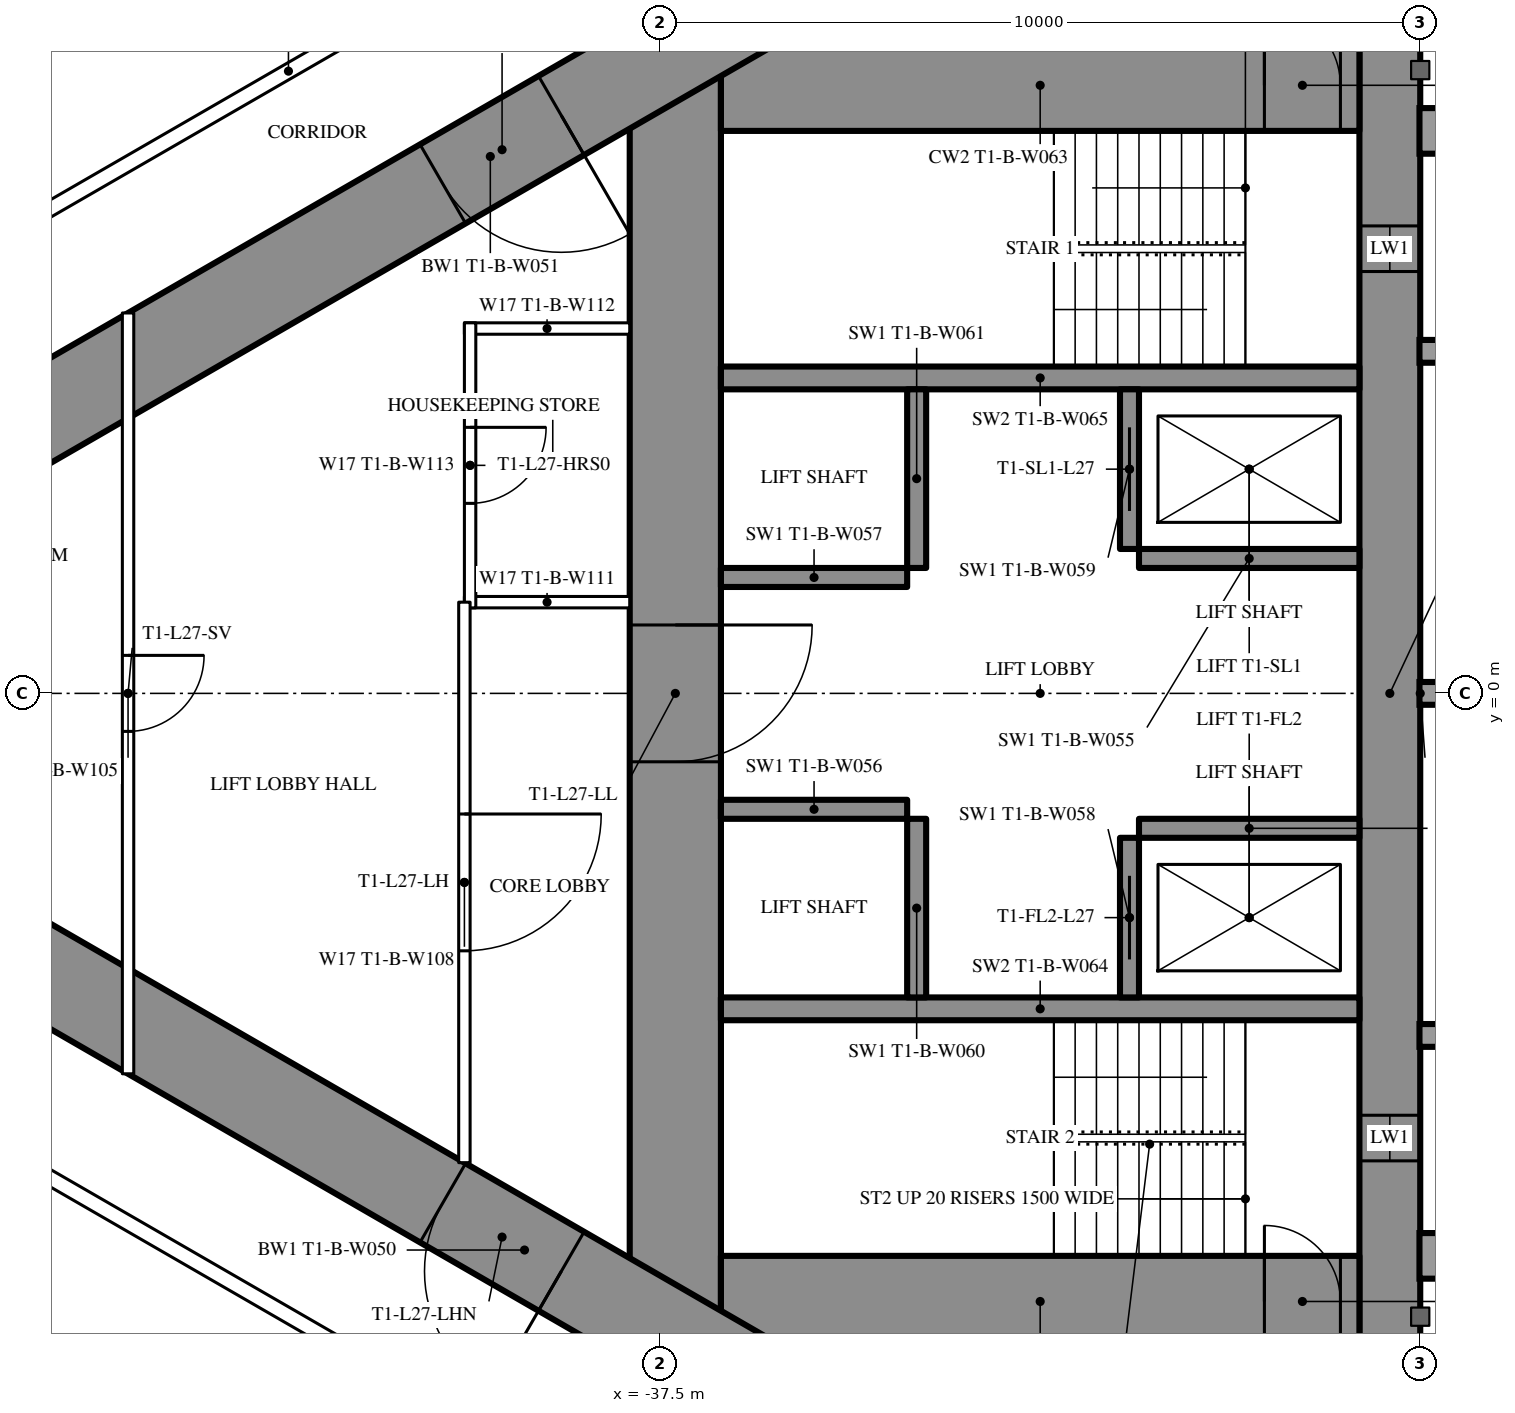
"""IFC4 building model, lengths in metres.
Left out: names, types, materials, properties, quantities, classifications, styles, units other than length and angle.
Written with IfcOpenShell. Run it as: python <this file> out.ifc"""

import sys

from ifc_helpers import new_model, si_unit, direction, frame, frame_2d, origin, place, context, subcontext, project, spatial, rectangle, extrude, element, fill, save


model = new_model("IFC4")
c1 = context("Model", 3, precision=1e-05, world=origin(), true_north=direction((0.0, 1.0)))
c2 = subcontext(c1, "Body", "Model", "MODEL_VIEW")
j1 = project(units=[si_unit("LENGTHUNIT", "METRE"), si_unit("PLANEANGLEUNIT", "RADIAN")], contexts=[c1])
p1 = place(None, origin())
s1 = spatial("IfcSite", under=j1, at=p1, CompositionType="ELEMENT")
p2 = place(p1, origin())
s2 = spatial("IfcBuilding", under=s1, at=p2, CompositionType="ELEMENT")
p3 = place(p2, frame((0.0, 0.0, 104.6)))
s3 = spatial("IfcBuildingStorey", under=s2, at=p3, CompositionType="ELEMENT", Elevation=104.6)
p4 = place(p3, frame((-27.9, 8.6, 0.0), z_axis=(0.0, 0.0, 1.0), x_axis=(0.0, -1.0, 0.0)))
e1 = element("IfcWall", 1, at=p4, inside=s3, PredefinedType="SHEAR", context=c2, shape_type="SweptSolid", body=[
    extrude(rectangle(XDim=17.2, YDim=0.8, at=frame_2d((8.6, 0.0))), origin(), (0.0, 0.0, 1.0), 3.5),
])
p5 = place(p4, frame((2.45, 0.0, 0.6)))
e2 = element("IfcOpeningElement", 2, at=p5, cuts=e1, PredefinedType="OPENING", context=c2, shape_type="SweptSolid", body=[
    extrude(rectangle(XDim=0.6, YDim=2.1, at=frame_2d((0.3, 1.05))), frame((0.0, 0.41, 0.0), z_axis=(0.0, -1.0, 0.0), x_axis=(1.0, 0.0, 0.0)), (0.0, 0.0, 1.0), 0.82),
])
p6 = place(p4, frame((14.15, 0.0, 0.6)))
e3 = element("IfcOpeningElement", 3, at=p6, cuts=e1, PredefinedType="OPENING", context=c2, shape_type="SweptSolid", body=[
    extrude(rectangle(XDim=0.6, YDim=2.1, at=frame_2d((0.3, 1.05))), frame((0.0, 0.41, 0.0), z_axis=(0.0, -1.0, 0.0), x_axis=(1.0, 0.0, 0.0)), (0.0, 0.0, 1.0), 0.82),
])
p7 = place(p3, frame((-37.3, 8.6, 0.0), z_axis=(0.0, 0.0, 1.0), x_axis=(0.0, -1.0, 0.0)))
e4 = element("IfcWall", 4, at=p7, inside=s3, PredefinedType="SHEAR", context=c2, shape_type="SweptSolid", body=[
    extrude(rectangle(XDim=17.2, YDim=1.2, at=frame_2d((8.6, 0.0))), origin(), (0.0, 0.0, 1.0), 3.5),
])
p8 = place(p7, frame((7.7, 0.0, 0.0)))
e5 = element("IfcOpeningElement", 5, at=p8, cuts=e4, PredefinedType="OPENING", context=c2, shape_type="SweptSolid", body=[
    extrude(rectangle(XDim=1.8, YDim=2.2, at=frame_2d((0.9, 1.1))), frame((0.0, 0.61, 0.0), z_axis=(0.0, -1.0, 0.0), x_axis=(1.0, 0.0, 0.0)), (0.0, 0.0, 1.0), 1.22),
])
p9 = place(p3, frame((-28.3, 8.0, 0.0), z_axis=(0.0, 0.0, 1.0), x_axis=(-1.0, 0.0, 0.0)))
e6 = element("IfcWall", 6, at=p9, inside=s3, PredefinedType="SHEAR", context=c2, shape_type="SweptSolid", body=[
    extrude(rectangle(XDim=8.4, YDim=1.2, at=frame_2d((4.2, 0.0))), origin(), (0.0, 0.0, 1.0), 3.5),
])
p10 = place(p9, frame((0.25, 0.0, 0.0)))
e7 = element("IfcOpeningElement", 7, at=p10, cuts=e6, PredefinedType="OPENING", context=c2, shape_type="SweptSolid", body=[
    extrude(rectangle(XDim=1.0, YDim=2.2, at=frame_2d((0.5, 1.1))), frame((0.0, 0.61, 0.0), z_axis=(0.0, -1.0, 0.0), x_axis=(1.0, 0.0, 0.0)), (0.0, 0.0, 1.0), 1.22),
])
p11 = place(p3, frame((-28.3, -8.0, 0.0), z_axis=(0.0, 0.0, 1.0), x_axis=(-1.0, 0.0, 0.0)))
e8 = element("IfcWall", 8, at=p11, inside=s3, PredefinedType="SHEAR", context=c2, shape_type="SweptSolid", body=[
    extrude(rectangle(XDim=8.4, YDim=1.2, at=frame_2d((4.2, 0.0))), origin(), (0.0, 0.0, 1.0), 3.5),
])
p12 = place(p11, frame((0.25, 0.0, 0.0)))
e9 = element("IfcOpeningElement", 9, at=p12, cuts=e8, PredefinedType="OPENING", context=c2, shape_type="SweptSolid", body=[
    extrude(rectangle(XDim=1.0, YDim=2.2, at=frame_2d((0.5, 1.1))), frame((0.0, 0.61, 0.0), z_axis=(0.0, -1.0, 0.0), x_axis=(1.0, 0.0, 0.0)), (0.0, 0.0, 1.0), 1.22),
])
for number, where, z_axis, x_axis in (
    (10, (-28.3, 4.15, 0.0), (0.0, 0.0, 1.0), (-1.0, 0.0, 0.0)),
    (11, (-28.3, -4.15, 0.0), (0.0, 0.0, 1.0), (-1.0, 0.0, 0.0)),
):
    element("IfcWall", number, at=place(p3, frame(where, z_axis=z_axis, x_axis=x_axis)), inside=s3, PredefinedType="SHEAR", context=c2, shape_type="SweptSolid", body=[
        extrude(rectangle(XDim=8.4, YDim=0.3, at=frame_2d((4.2, 0.0))), origin(), (0.0, 0.0, 1.0), 3.5),
    ])
p13 = place(p3, frame((-31.325, 4.0, 0.0), z_axis=(0.0, 0.0, 1.0), x_axis=(0.0, -1.0, 0.0)))
e12 = element("IfcWall", 12, at=p13, inside=s3, PredefinedType="SHEAR", context=c2, shape_type="SweptSolid", body=[
    extrude(rectangle(XDim=2.1, YDim=0.25, at=frame_2d((1.05, 0.0))), origin(), (0.0, 0.0, 1.0), 3.5),
])
p14 = place(p13, frame((0.5, 0.0, 0.0)))
e13 = element("IfcOpeningElement", 13, at=p14, cuts=e12, PredefinedType="OPENING", context=c2, shape_type="SweptSolid", body=[
    extrude(rectangle(XDim=1.1, YDim=2.2, at=frame_2d((0.55, 1.1))), frame((0.0, 0.135, 0.0), z_axis=(0.0, -1.0, 0.0), x_axis=(1.0, 0.0, 0.0)), (0.0, 0.0, 1.0), 0.27),
])
p15 = place(p3, frame((-34.125, 4.0, 0.0), z_axis=(0.0, 0.0, 1.0), x_axis=(0.0, -1.0, 0.0)))
e14 = element("IfcWall", 14, at=p15, inside=s3, PredefinedType="SHEAR", context=c2, shape_type="SweptSolid", body=[
    extrude(rectangle(XDim=2.35, YDim=0.25, at=frame_2d((1.175, 0.0))), origin(), (0.0, 0.0, 1.0), 3.5),
])
p16 = place(p3, frame((-28.3, 1.775, 0.0), z_axis=(0.0, 0.0, 1.0), x_axis=(-1.0, 0.0, 0.0)))
e15 = element("IfcWall", 15, at=p16, inside=s3, PredefinedType="SHEAR", context=c2, shape_type="SweptSolid", body=[
    extrude(rectangle(XDim=2.9, YDim=0.25, at=frame_2d((1.45, 0.0))), origin(), (0.0, 0.0, 1.0), 3.5),
])
p17 = place(p3, frame((-34.25, 1.525, 0.0), z_axis=(0.0, 0.0, 1.0), x_axis=(-1.0, 0.0, 0.0)))
e16 = element("IfcWall", 16, at=p17, inside=s3, PredefinedType="SHEAR", context=c2, shape_type="SweptSolid", body=[
    extrude(rectangle(XDim=2.45, YDim=0.25, at=frame_2d((1.225, 0.0))), origin(), (0.0, 0.0, 1.0), 3.5),
])
p18 = place(p3, frame((-31.325, -1.9, 0.0), z_axis=(0.0, 0.0, 1.0), x_axis=(0.0, -1.0, 0.0)))
e17 = element("IfcWall", 17, at=p18, inside=s3, PredefinedType="SHEAR", context=c2, shape_type="SweptSolid", body=[
    extrude(rectangle(XDim=2.1, YDim=0.25, at=frame_2d((1.05, 0.0))), origin(), (0.0, 0.0, 1.0), 3.5),
])
p19 = place(p18, frame((0.5, 0.0, 0.0)))
e18 = element("IfcOpeningElement", 18, at=p19, cuts=e17, PredefinedType="OPENING", context=c2, shape_type="SweptSolid", body=[
    extrude(rectangle(XDim=1.1, YDim=2.2, at=frame_2d((0.55, 1.1))), frame((0.0, 0.135, 0.0), z_axis=(0.0, -1.0, 0.0), x_axis=(1.0, 0.0, 0.0)), (0.0, 0.0, 1.0), 0.27),
])
p20 = place(p3, frame((-34.125, -1.65, 0.0), z_axis=(0.0, 0.0, 1.0), x_axis=(0.0, -1.0, 0.0)))
e19 = element("IfcWall", 19, at=p20, inside=s3, PredefinedType="SHEAR", context=c2, shape_type="SweptSolid", body=[
    extrude(rectangle(XDim=2.35, YDim=0.25, at=frame_2d((1.175, 0.0))), origin(), (0.0, 0.0, 1.0), 3.5),
])
p21 = place(p3, frame((-28.3, -1.775, 0.0), z_axis=(0.0, 0.0, 1.0), x_axis=(-1.0, 0.0, 0.0)))
e20 = element("IfcWall", 20, at=p21, inside=s3, PredefinedType="SHEAR", context=c2, shape_type="SweptSolid", body=[
    extrude(rectangle(XDim=2.9, YDim=0.25, at=frame_2d((1.45, 0.0))), origin(), (0.0, 0.0, 1.0), 3.5),
])
p22 = place(p3, frame((-34.25, -1.525, 0.0), z_axis=(0.0, 0.0, 1.0), x_axis=(-1.0, 0.0, 0.0)))
e21 = element("IfcWall", 21, at=p22, inside=s3, PredefinedType="SHEAR", context=c2, shape_type="SweptSolid", body=[
    extrude(rectangle(XDim=2.45, YDim=0.25, at=frame_2d((1.225, 0.0))), origin(), (0.0, 0.0, 1.0), 3.5),
])
p23 = place(p3, frame((-27.2, 14.3, 0.0), z_axis=(0.0, 0.0, 1.0), x_axis=(-0.866026593062, -0.499997940104, 0.0)))
e22 = element("IfcWall", 22, at=p23, inside=s3, PredefinedType="SHEAR", context=c2, shape_type="SweptSolid", body=[
    extrude(rectangle(XDim=28.946, YDim=1.2, at=frame_2d((14.473, 0.0))), origin(), (0.0, 0.0, 1.0), 3.5),
])
p24 = place(p23, frame((4.6, 0.0, 0.0)))
e23 = element("IfcOpeningElement", 23, at=p24, cuts=e22, PredefinedType="OPENING", context=c2, shape_type="SweptSolid", body=[
    extrude(rectangle(XDim=1.0, YDim=2.2, at=frame_2d((0.5, 1.1))), frame((0.0, 0.61, 0.0), z_axis=(0.0, -1.0, 0.0), x_axis=(1.0, 0.0, 0.0)), (0.0, 0.0, 1.0), 1.22),
])
p25 = place(p23, frame((13.395, 0.0, 0.0)))
e24 = element("IfcOpeningElement", 24, at=p25, cuts=e22, PredefinedType="OPENING", context=c2, shape_type="SweptSolid", body=[
    extrude(rectangle(XDim=1.8, YDim=2.2, at=frame_2d((0.9, 1.1))), frame((0.0, 0.61, 0.0), z_axis=(0.0, -1.0, 0.0), x_axis=(1.0, 0.0, 0.0)), (0.0, 0.0, 1.0), 1.22),
])
p26 = place(p3, frame((-27.2, -14.3, 0.0), z_axis=(0.0, 0.0, 1.0), x_axis=(-0.866024021859, 0.500002393557, 0.0)))
e25 = element("IfcWall", 25, at=p26, inside=s3, PredefinedType="SHEAR", context=c2, shape_type="SweptSolid", body=[
    extrude(rectangle(XDim=27.907, YDim=1.2, at=frame_2d((13.954, 0.0))), origin(), (0.0, 0.0, 1.0), 3.5),
])
p27 = place(p26, frame((4.6, 0.0, 0.0)))
e26 = element("IfcOpeningElement", 26, at=p27, cuts=e25, PredefinedType="OPENING", context=c2, shape_type="SweptSolid", body=[
    extrude(rectangle(XDim=1.0, YDim=2.2, at=frame_2d((0.5, 1.1))), frame((0.0, 0.61, 0.0), z_axis=(0.0, -1.0, 0.0), x_axis=(1.0, 0.0, 0.0)), (0.0, 0.0, 1.0), 1.22),
])
p28 = place(p26, frame((13.395, 0.0, 0.0)))
e27 = element("IfcOpeningElement", 27, at=p28, cuts=e25, PredefinedType="OPENING", context=c2, shape_type="SweptSolid", body=[
    extrude(rectangle(XDim=1.8, YDim=2.2, at=frame_2d((0.9, 1.1))), frame((0.0, 0.61, 0.0), z_axis=(0.0, -1.0, 0.0), x_axis=(1.0, 0.0, 0.0)), (0.0, 0.0, 1.0), 1.22),
])
p29 = place(p3, frame((-36.92, -11.344, 0.0), z_axis=(0.0, 0.0, 1.0), x_axis=(-0.866028313256, 0.499994960614, 0.0)))
e28 = element("IfcWall", 28, at=p29, inside=s3, PredefinedType="PARTITIONING", context=c2, shape_type="SweptSolid", body=[
    extrude(rectangle(XDim=22.568, YDim=0.2, at=frame_2d((11.284, 0.0))), origin(), (0.0, 0.0, 1.0), 3.25),
])
p30 = place(p29, frame((21.018, 0.0, 0.0)))
e29 = element("IfcOpeningElement", 29, at=p30, cuts=e28, PredefinedType="OPENING", context=c2, shape_type="SweptSolid", body=[
    extrude(rectangle(XDim=0.95, YDim=2.2, at=frame_2d((0.475, 1.1))), frame((0.0, 0.11, 0.0), z_axis=(0.0, -1.0, 0.0), x_axis=(1.0, 0.0, 0.0)), (0.0, 0.0, 1.0), 0.22),
])
p31 = place(p29, frame((3.35, 0.0, 0.0)))
e30 = element("IfcOpeningElement", 30, at=p31, cuts=e28, PredefinedType="OPENING", context=c2, shape_type="SweptSolid", body=[
    extrude(rectangle(XDim=1.0, YDim=2.2, at=frame_2d((0.5, 1.1))), frame((0.0, 0.11, 0.0), z_axis=(0.0, -1.0, 0.0), x_axis=(1.0, 0.0, 0.0)), (0.0, 0.0, 1.0), 0.22),
])
p32 = place(p3, frame((-37.7, 10.894, 0.0), z_axis=(0.0, 0.0, 1.0), x_axis=(-0.866027551079, -0.499996280759, 0.0)))
e31 = element("IfcWall", 31, at=p32, inside=s3, PredefinedType="PARTITIONING", context=c2, shape_type="SweptSolid", body=[
    extrude(rectangle(XDim=10.831, YDim=0.2, at=frame_2d((5.415, 0.0))), origin(), (0.0, 0.0, 1.0), 3.25),
])
p33 = place(p32, frame((0.6, 0.0, 0.0)))
e32 = element("IfcOpeningElement", 32, at=p33, cuts=e31, PredefinedType="OPENING", context=c2, shape_type="SweptSolid", body=[
    extrude(rectangle(XDim=0.95, YDim=2.2, at=frame_2d((0.475, 1.1))), frame((0.0, 0.11, 0.0), z_axis=(0.0, -1.0, 0.0), x_axis=(1.0, 0.0, 0.0)), (0.0, 0.0, 1.0), 0.22),
])
for number, where, z_axis, x_axis in (
    (33, (-37.9, 1.2, 0.0), (0.0, 0.0, 1.0), (-1.0, 0.0, 0.0)),
    (34, (-37.9, 4.8, 0.0), (0.0, 0.0, 1.0), (-1.0, 0.0, 0.0)),
):
    element("IfcWall", number, at=place(p3, frame(where, z_axis=z_axis, x_axis=x_axis)), inside=s3, PredefinedType="PARTITIONING", context=c2, shape_type="SweptSolid", body=[
        extrude(rectangle(XDim=2.175, YDim=0.15, at=frame_2d((1.087, 0.0))), origin(), (0.0, 0.0, 1.0), 3.25),
    ])
p34 = place(p3, frame((-40.0, 4.875, 0.0), z_axis=(0.0, 0.0, 1.0), x_axis=(0.0, -1.0, 0.0)))
e35 = element("IfcWall", 35, at=p34, inside=s3, PredefinedType="PARTITIONING", context=c2, shape_type="SweptSolid", body=[
    extrude(rectangle(XDim=3.75, YDim=0.15, at=frame_2d((1.875, 0.0))), origin(), (0.0, 0.0, 1.0), 3.25),
])
p35 = place(p34, frame((1.375, 0.0, 0.0)))
e36 = element("IfcOpeningElement", 36, at=p35, cuts=e35, PredefinedType="OPENING", context=c2, shape_type="SweptSolid", body=[
    extrude(rectangle(XDim=1.0, YDim=2.2, at=frame_2d((0.5, 1.1))), frame((0.0, 0.085, 0.0), z_axis=(0.0, -1.0, 0.0), x_axis=(1.0, 0.0, 0.0)), (0.0, 0.0, 1.0), 0.17),
])
p36 = place(p3, frame((-40.075, 1.2, 0.0), z_axis=(0.0, 0.0, 1.0), x_axis=(0.0, -1.0, 0.0)))
e37 = element("IfcWall", 37, at=p36, inside=s3, PredefinedType="PARTITIONING", context=c2, shape_type="SweptSolid", body=[
    extrude(rectangle(XDim=7.374, YDim=0.15, at=frame_2d((3.687, 0.0))), origin(), (0.0, 0.0, 1.0), 3.25),
])
p37 = place(p36, frame((2.787, 0.0, 0.0)))
e38 = element("IfcOpeningElement", 38, at=p37, cuts=e37, PredefinedType="OPENING", context=c2, shape_type="SweptSolid", body=[
    extrude(rectangle(XDim=1.8, YDim=2.2, at=frame_2d((0.9, 1.1))), frame((0.0, 0.085, 0.0), z_axis=(0.0, -1.0, 0.0), x_axis=(1.0, 0.0, 0.0)), (0.0, 0.0, 1.0), 0.17),
])
p38 = place(p3, frame((-44.5, 5.005, 0.0), z_axis=(0.0, 0.0, 1.0), x_axis=(0.0, -1.0, 0.0)))
e39 = element("IfcWall", 39, at=p38, inside=s3, PredefinedType="PARTITIONING", context=c2, shape_type="SweptSolid", body=[
    extrude(rectangle(XDim=10.009, YDim=0.15, at=frame_2d((5.005, 0.0))), origin(), (0.0, 0.0, 1.0), 2.45),
])
p39 = place(p38, frame((4.505, 0.0, 0.0)))
e40 = element("IfcOpeningElement", 40, at=p39, cuts=e39, PredefinedType="OPENING", context=c2, shape_type="SweptSolid", body=[
    extrude(rectangle(XDim=1.0, YDim=2.2, at=frame_2d((0.5, 1.1))), frame((0.0, 0.085, 0.0), z_axis=(0.0, -1.0, 0.0), x_axis=(1.0, 0.0, 0.0)), (0.0, 0.0, 1.0), 0.17),
])
p40 = place(p35, origin())
e41 = element("IfcDoor", 41, at=p40, inside=s3, OperationType="SINGLE_SWING_LEFT", PredefinedType="DOOR", context=c2, shape_type="SweptSolid", body=[
    extrude(rectangle(XDim=1.0, YDim=2.2, at=frame_2d((0.5, 1.1))), frame((0.0, 0.025, 0.0), z_axis=(0.0, -1.0, 0.0), x_axis=(1.0, 0.0, 0.0)), (0.0, 0.0, 1.0), 0.05),
])
fill(e36, e41)
p41 = place(p37, origin())
e42 = element("IfcDoor", 42, at=p41, inside=s3, OperationType="DOUBLE_DOOR_SINGLE_SWING", PredefinedType="DOOR", context=c2, shape_type="SweptSolid", body=[
    extrude(rectangle(XDim=1.8, YDim=2.2, at=frame_2d((0.9, 1.1))), frame((0.0, 0.025, 0.0), z_axis=(0.0, -1.0, 0.0), x_axis=(1.0, 0.0, 0.0)), (0.0, 0.0, 1.0), 0.05),
])
fill(e38, e42)
p42 = place(p39, origin())
e43 = element("IfcDoor", 43, at=p42, inside=s3, OperationType="SINGLE_SWING_LEFT", PredefinedType="DOOR", context=c2, shape_type="SweptSolid", body=[
    extrude(rectangle(XDim=1.0, YDim=2.2, at=frame_2d((0.5, 1.1))), frame((0.0, 0.025, 0.0), z_axis=(0.0, -1.0, 0.0), x_axis=(1.0, 0.0, 0.0)), (0.0, 0.0, 1.0), 0.05),
])
fill(e40, e43)
p43 = place(p25, origin())
e44 = element("IfcDoor", 44, at=p43, inside=s3, OperationType="DOUBLE_DOOR_SINGLE_SWING", PredefinedType="DOOR", context=c2, shape_type="SweptSolid", body=[
    extrude(rectangle(XDim=1.8, YDim=2.2, at=frame_2d((0.9, 1.1))), frame((0.0, 0.025, 0.0), z_axis=(0.0, -1.0, 0.0), x_axis=(1.0, 0.0, 0.0)), (0.0, 0.0, 1.0), 0.05),
])
fill(e24, e44)
p44 = place(p28, origin())
e45 = element("IfcDoor", 45, at=p44, inside=s3, OperationType="DOUBLE_DOOR_SINGLE_SWING", PredefinedType="DOOR", context=c2, shape_type="SweptSolid", body=[
    extrude(rectangle(XDim=1.8, YDim=2.2, at=frame_2d((0.9, 1.1))), frame((0.0, 0.025, 0.0), z_axis=(0.0, -1.0, 0.0), x_axis=(1.0, 0.0, 0.0)), (0.0, 0.0, 1.0), 0.05),
])
fill(e27, e45)
p45 = place(p8, origin())
e46 = element("IfcDoor", 46, at=p45, inside=s3, OperationType="DOUBLE_DOOR_SINGLE_SWING", PredefinedType="DOOR", context=c2, shape_type="SweptSolid", body=[
    extrude(rectangle(XDim=1.8, YDim=2.2, at=frame_2d((0.9, 1.1))), frame((0.0, 0.025, 0.0), z_axis=(0.0, -1.0, 0.0), x_axis=(1.0, 0.0, 0.0)), (0.0, 0.0, 1.0), 0.05),
])
fill(e5, e46)
p46 = place(p10, origin())
e47 = element("IfcDoor", 47, at=p46, inside=s3, OperationType="SINGLE_SWING_RIGHT", PredefinedType="DOOR", context=c2, shape_type="SweptSolid", body=[
    extrude(rectangle(XDim=1.0, YDim=2.2, at=frame_2d((0.5, 1.1))), frame((0.0, 0.025, 0.0), z_axis=(0.0, -1.0, 0.0), x_axis=(1.0, 0.0, 0.0)), (0.0, 0.0, 1.0), 0.05),
])
fill(e7, e47)
p47 = place(p12, origin())
e48 = element("IfcDoor", 48, at=p47, inside=s3, OperationType="SINGLE_SWING_RIGHT", PredefinedType="DOOR", context=c2, shape_type="SweptSolid", body=[
    extrude(rectangle(XDim=1.0, YDim=2.2, at=frame_2d((0.5, 1.1))), frame((0.0, 0.025, 0.0), z_axis=(0.0, -1.0, 0.0), x_axis=(1.0, 0.0, 0.0)), (0.0, 0.0, 1.0), 0.05),
])
fill(e9, e48)
p48 = place(p14, origin())
e49 = element("IfcDoor", 49, at=p48, inside=s3, OperationType="SLIDING_TO_LEFT", PredefinedType="USERDEFINED", context=c2, shape_type="SweptSolid", body=[
    extrude(rectangle(XDim=1.1, YDim=2.2, at=frame_2d((0.55, 1.1))), frame((0.0, 0.025, 0.0), z_axis=(0.0, -1.0, 0.0), x_axis=(1.0, 0.0, 0.0)), (0.0, 0.0, 1.0), 0.05),
])
fill(e13, e49)
p49 = place(p19, origin())
e50 = element("IfcDoor", 50, at=p49, inside=s3, OperationType="SLIDING_TO_LEFT", PredefinedType="USERDEFINED", context=c2, shape_type="SweptSolid", body=[
    extrude(rectangle(XDim=1.1, YDim=2.2, at=frame_2d((0.55, 1.1))), frame((0.0, 0.025, 0.0), z_axis=(0.0, -1.0, 0.0), x_axis=(1.0, 0.0, 0.0)), (0.0, 0.0, 1.0), 0.05),
])
fill(e18, e50)
p50 = place(p5, origin())
e51 = element("IfcWindow", 51, at=p50, inside=s3, PartitioningType="SINGLE_PANEL", PredefinedType="WINDOW", context=c2, shape_type="SweptSolid", body=[
    extrude(rectangle(XDim=0.6, YDim=2.1, at=frame_2d((0.3, 1.05))), frame((0.0, 0.03, 0.0), z_axis=(0.0, -1.0, 0.0), x_axis=(1.0, 0.0, 0.0)), (0.0, 0.0, 1.0), 0.06),
])
fill(e2, e51)
p51 = place(p6, origin())
e52 = element("IfcWindow", 52, at=p51, inside=s3, PartitioningType="SINGLE_PANEL", PredefinedType="WINDOW", context=c2, shape_type="SweptSolid", body=[
    extrude(rectangle(XDim=0.6, YDim=2.1, at=frame_2d((0.3, 1.05))), frame((0.0, 0.03, 0.0), z_axis=(0.0, -1.0, 0.0), x_axis=(1.0, 0.0, 0.0)), (0.0, 0.0, 1.0), 0.06),
])
fill(e3, e52)
save(model, sys.argv[1])
